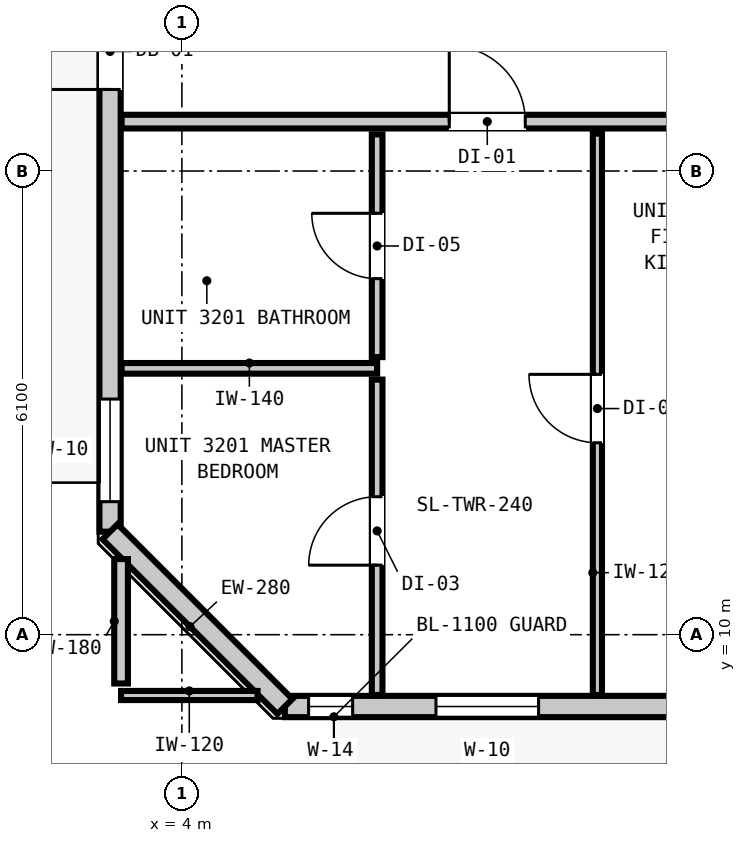
"""IFC4 building model, lengths in metres.
Left out: names, types, materials, properties, quantities, classifications, styles, units other than length and angle.
Written with IfcOpenShell. Run it as: python <this file> out.ifc"""

import sys

from ifc_helpers import new_model, si_unit, direction, frame, frame_2d, origin, place, context, subcontext, project, spatial, rectangle, extrude, element, fill, save


model = new_model("IFC4")
c1 = context("Model", 3, precision=1e-05, world=origin(), true_north=direction((0.0, 1.0)))
c2 = subcontext(c1, "Body", "Model", "MODEL_VIEW")
j1 = project(units=[si_unit("LENGTHUNIT", "METRE"), si_unit("PLANEANGLEUNIT", "RADIAN")], contexts=[c1])
p1 = place(None, origin())
s1 = spatial("IfcSite", under=j1, at=p1, CompositionType="ELEMENT")
p2 = place(p1, origin())
s2 = spatial("IfcBuilding", under=s1, at=p2, CompositionType="ELEMENT")
p3 = place(p2, frame((0.0, 0.0, 112.72)))
s3 = spatial("IfcBuildingStorey", under=s2, at=p3, CompositionType="ELEMENT", Elevation=112.72)
p4 = place(p3, frame((3.055, 11.355, 0.0), z_axis=(0.0, 0.0, 1.0), x_axis=(0.0, 1.0, 0.0)))
e1 = element("IfcWall", 1, at=p4, inside=s3, PredefinedType="STANDARD", context=c2, shape_type="SweptSolid", body=[
    extrude(rectangle(XDim=32.29, YDim=0.28, at=frame_2d((16.145, 0.0))), origin(), (0.0, 0.0, 1.0), 3.08),
])
p5 = place(p4, frame((5.818, 0.0, 0.0)))
e2 = element("IfcOpeningElement", 2, at=p5, cuts=e1, PredefinedType="OPENING", context=c2, shape_type="SweptSolid", body=[
    extrude(rectangle(XDim=1.0, YDim=2.15, at=frame_2d((0.5, 1.075))), frame((0.0, 0.15, 0.0), z_axis=(0.0, -1.0, 0.0), x_axis=(1.0, 0.0, 0.0)), (0.0, 0.0, 1.0), 0.3),
])
p6 = place(p4, frame((0.395, 0.0, 0.85)))
e3 = element("IfcOpeningElement", 3, at=p6, cuts=e1, PredefinedType="OPENING", context=c2, shape_type="SweptSolid", body=[
    extrude(rectangle(XDim=1.35, YDim=1.85, at=frame_2d((0.675, 0.925))), frame((0.0, 0.15, 0.0), z_axis=(0.0, -1.0, 0.0), x_axis=(1.0, 0.0, 0.0)), (0.0, 0.0, 1.0), 0.3),
])
p7 = place(p4, frame((20.78, 0.0, 0.85)))
e4 = element("IfcOpeningElement", 4, at=p7, cuts=e1, PredefinedType="OPENING", context=c2, shape_type="SweptSolid", body=[
    extrude(rectangle(XDim=1.35, YDim=1.85, at=frame_2d((0.675, 0.925))), frame((0.0, 0.15, 0.0), z_axis=(0.0, -1.0, 0.0), x_axis=(1.0, 0.0, 0.0)), (0.0, 0.0, 1.0), 0.3),
])
p8 = place(p4, frame((12.61, 0.0, 0.85)))
e5 = element("IfcOpeningElement", 5, at=p8, cuts=e1, PredefinedType="OPENING", context=c2, shape_type="SweptSolid", body=[
    extrude(rectangle(XDim=1.35, YDim=1.85, at=frame_2d((0.675, 0.925))), frame((0.0, 0.15, 0.0), z_axis=(0.0, -1.0, 0.0), x_axis=(1.0, 0.0, 0.0)), (0.0, 0.0, 1.0), 0.3),
])
p9 = place(p4, frame((24.73, 0.0, 0.85)))
e6 = element("IfcOpeningElement", 6, at=p9, cuts=e1, PredefinedType="OPENING", context=c2, shape_type="SweptSolid", body=[
    extrude(rectangle(XDim=1.35, YDim=1.85, at=frame_2d((0.675, 0.925))), frame((0.0, 0.15, 0.0), z_axis=(0.0, -1.0, 0.0), x_axis=(1.0, 0.0, 0.0)), (0.0, 0.0, 1.0), 0.3),
])
p10 = place(p3, frame((40.445, 9.055, 0.0), z_axis=(0.0, 0.0, 1.0), x_axis=(-1.0, 0.0, 0.0)))
e7 = element("IfcWall", 7, at=p10, inside=s3, PredefinedType="STANDARD", context=c2, shape_type="SweptSolid", body=[
    extrude(rectangle(XDim=35.09, YDim=0.28, at=frame_2d((17.545, 0.0))), origin(), (0.0, 0.0, 1.0), 3.08),
])
p11 = place(p10, frame((5.114, 0.0, 0.0)))
e8 = element("IfcOpeningElement", 8, at=p11, cuts=e7, PredefinedType="OPENING", context=c2, shape_type="SweptSolid", body=[
    extrude(rectangle(XDim=1.0, YDim=2.15, at=frame_2d((0.5, 1.075))), frame((0.0, 0.15, 0.0), z_axis=(0.0, -1.0, 0.0), x_axis=(1.0, 0.0, 0.0)), (0.0, 0.0, 1.0), 0.3),
])
p12 = place(p10, frame((31.752, 0.0, 0.85)))
e9 = element("IfcOpeningElement", 9, at=p12, cuts=e7, PredefinedType="OPENING", context=c2, shape_type="SweptSolid", body=[
    extrude(rectangle(XDim=1.35, YDim=1.85, at=frame_2d((0.675, 0.925))), frame((0.0, 0.15, 0.0), z_axis=(0.0, -1.0, 0.0), x_axis=(1.0, 0.0, 0.0)), (0.0, 0.0, 1.0), 0.3),
])
p13 = place(p10, frame((34.198, 0.0, 0.85)))
e10 = element("IfcOpeningElement", 10, at=p13, cuts=e7, PredefinedType="OPENING", context=c2, shape_type="SweptSolid", body=[
    extrude(rectangle(XDim=0.58, YDim=1.5, at=frame_2d((0.29, 0.75))), frame((0.0, 0.15, 0.0), z_axis=(0.0, -1.0, 0.0), x_axis=(1.0, 0.0, 0.0)), (0.0, 0.0, 1.0), 0.3),
])
p14 = place(p10, frame((21.39, 0.0, 0.85)))
e11 = element("IfcOpeningElement", 11, at=p14, cuts=e7, PredefinedType="OPENING", context=c2, shape_type="SweptSolid", body=[
    extrude(rectangle(XDim=1.35, YDim=1.85, at=frame_2d((0.675, 0.925))), frame((0.0, 0.15, 0.0), z_axis=(0.0, -1.0, 0.0), x_axis=(1.0, 0.0, 0.0)), (0.0, 0.0, 1.0), 0.3),
])
p15 = place(p10, frame((24.59, 0.0, 0.85)))
e12 = element("IfcOpeningElement", 12, at=p15, cuts=e7, PredefinedType="OPENING", context=c2, shape_type="SweptSolid", body=[
    extrude(rectangle(XDim=1.35, YDim=1.85, at=frame_2d((0.675, 0.925))), frame((0.0, 0.15, 0.0), z_axis=(0.0, -1.0, 0.0), x_axis=(1.0, 0.0, 0.0)), (0.0, 0.0, 1.0), 0.3),
])
p16 = place(p10, frame((14.699, 0.0, 0.85)))
e13 = element("IfcOpeningElement", 13, at=p16, cuts=e7, PredefinedType="OPENING", context=c2, shape_type="SweptSolid", body=[
    extrude(rectangle(XDim=1.35, YDim=1.85, at=frame_2d((0.675, 0.925))), frame((0.0, 0.15, 0.0), z_axis=(0.0, -1.0, 0.0), x_axis=(1.0, 0.0, 0.0)), (0.0, 0.0, 1.0), 0.3),
])
p17 = place(p10, frame((6.557, 0.0, 0.85)))
e14 = element("IfcOpeningElement", 14, at=p17, cuts=e7, PredefinedType="OPENING", context=c2, shape_type="SweptSolid", body=[
    extrude(rectangle(XDim=1.35, YDim=1.85, at=frame_2d((0.675, 0.925))), frame((0.0, 0.15, 0.0), z_axis=(0.0, -1.0, 0.0), x_axis=(1.0, 0.0, 0.0)), (0.0, 0.0, 1.0), 0.3),
])
p18 = place(p10, frame((8.823, 0.0, 0.85)))
e15 = element("IfcOpeningElement", 15, at=p18, cuts=e7, PredefinedType="OPENING", context=c2, shape_type="SweptSolid", body=[
    extrude(rectangle(XDim=1.35, YDim=1.85, at=frame_2d((0.675, 0.925))), frame((0.0, 0.15, 0.0), z_axis=(0.0, -1.0, 0.0), x_axis=(1.0, 0.0, 0.0)), (0.0, 0.0, 1.0), 0.3),
])
p19 = place(p3, frame((5.355, 9.055, 0.0), z_axis=(0.0, 0.0, 1.0), x_axis=(-0.707106781187, 0.707106781187, 0.0)))
e16 = element("IfcWall", 16, at=p19, inside=s3, PredefinedType="STANDARD", context=c2, shape_type="SweptSolid", body=[
    extrude(rectangle(XDim=3.253, YDim=0.28, at=frame_2d((1.626, 0.0))), origin(), (0.0, 0.0, 1.0), 3.08),
])
p20 = place(p3, frame((3.207, 16.75, 0.0), z_axis=(0.0, 0.0, 1.0), x_axis=(1.0, 0.0, 0.0)))
e17 = element("IfcWall", 17, at=p20, inside=s3, PredefinedType="PARTITIONING", context=c2, shape_type="SweptSolid", body=[
    extrude(rectangle(XDim=39.386, YDim=0.18, at=frame_2d((19.693, 0.0))), origin(), (0.0, 0.0, 1.0), 3.08),
])
p21 = place(p20, frame((4.311, 0.0, 0.0)))
e18 = element("IfcOpeningElement", 18, at=p21, cuts=e17, PredefinedType="OPENING", context=c2, shape_type="SweptSolid", body=[
    extrude(rectangle(XDim=1.0, YDim=2.15, at=frame_2d((0.5, 1.075))), frame((0.0, 0.1, 0.0), z_axis=(0.0, -1.0, 0.0), x_axis=(1.0, 0.0, 0.0)), (0.0, 0.0, 1.0), 0.2),
])
p22 = place(p20, frame((15.834, 0.0, 0.0)))
e19 = element("IfcOpeningElement", 19, at=p22, cuts=e17, PredefinedType="OPENING", context=c2, shape_type="SweptSolid", body=[
    extrude(rectangle(XDim=1.0, YDim=2.15, at=frame_2d((0.5, 1.075))), frame((0.0, 0.1, 0.0), z_axis=(0.0, -1.0, 0.0), x_axis=(1.0, 0.0, 0.0)), (0.0, 0.0, 1.0), 0.2),
])
p23 = place(p20, frame((31.654, 0.0, 0.0)))
e20 = element("IfcOpeningElement", 20, at=p23, cuts=e17, PredefinedType="OPENING", context=c2, shape_type="SweptSolid", body=[
    extrude(rectangle(XDim=1.0, YDim=2.15, at=frame_2d((0.5, 1.075))), frame((0.0, 0.1, 0.0), z_axis=(0.0, -1.0, 0.0), x_axis=(1.0, 0.0, 0.0)), (0.0, 0.0, 1.0), 0.2),
])
p24 = place(p3, frame((3.207, 13.504, 0.0), z_axis=(0.0, 0.0, 1.0), x_axis=(1.0, 0.0, 0.0)))
e21 = element("IfcWall", 21, at=p24, inside=s3, PredefinedType="PARTITIONING", context=c2, shape_type="SweptSolid", body=[
    extrude(rectangle(XDim=3.362, YDim=0.14, at=frame_2d((1.681, 0.0))), origin(), (0.0, 0.0, 1.0), 3.08),
])
p25 = place(p3, frame((3.2, 9.2, 0.0), z_axis=(0.0, 0.0, 1.0), x_axis=(1.0, 0.0, 0.0)))
e22 = element("IfcWall", 22, at=p25, inside=s3, PredefinedType="PARTITIONING", context=c2, shape_type="SweptSolid", body=[
    extrude(rectangle(XDim=1.795, YDim=0.12, at=frame_2d((0.897, 0.0))), origin(), (0.0, 0.0, 1.0), 3.08),
])
p26 = place(p3, frame((3.2, 9.358, 0.0), z_axis=(0.0, 0.0, 1.0), x_axis=(0.0, 1.0, 0.0)))
e23 = element("IfcWall", 23, at=p26, inside=s3, PredefinedType="PARTITIONING", context=c2, shape_type="SweptSolid", body=[
    extrude(rectangle(XDim=1.637, YDim=0.18, at=frame_2d((0.819, 0.0))), origin(), (0.0, 0.0, 1.0), 3.08),
])
p27 = place(p3, frame((6.569, 9.207, 0.0), z_axis=(0.0, 0.0, 1.0), x_axis=(0.0, 1.0, 0.0)))
e24 = element("IfcWall", 24, at=p27, inside=s3, PredefinedType="PARTITIONING", context=c2, shape_type="SweptSolid", body=[
    extrude(rectangle(XDim=4.149, YDim=0.14, at=frame_2d((2.074, 0.0))), origin(), (0.0, 0.0, 1.0), 3.08),
])
p28 = place(p27, frame((1.708, 0.0, 0.0)))
e25 = element("IfcOpeningElement", 25, at=p28, cuts=e24, PredefinedType="OPENING", context=c2, shape_type="SweptSolid", body=[
    extrude(rectangle(XDim=0.9, YDim=2.1, at=frame_2d((0.45, 1.05))), frame((0.0, 0.08, 0.0), z_axis=(0.0, -1.0, 0.0), x_axis=(1.0, 0.0, 0.0)), (0.0, 0.0, 1.0), 0.16),
])
p29 = place(p3, frame((6.569, 13.652, 0.0), z_axis=(0.0, 0.0, 1.0), x_axis=(0.0, 1.0, 0.0)))
e26 = element("IfcWall", 26, at=p29, inside=s3, PredefinedType="PARTITIONING", context=c2, shape_type="SweptSolid", body=[
    extrude(rectangle(XDim=2.93, YDim=0.14, at=frame_2d((1.465, 0.0))), origin(), (0.0, 0.0, 1.0), 3.08),
])
p30 = place(p29, frame((1.032, 0.0, 0.0)))
e27 = element("IfcOpeningElement", 27, at=p30, cuts=e26, PredefinedType="OPENING", context=c2, shape_type="SweptSolid", body=[
    extrude(rectangle(XDim=0.86, YDim=2.02, at=frame_2d((0.43, 1.01))), frame((0.0, 0.08, 0.0), z_axis=(0.0, -1.0, 0.0), x_axis=(1.0, 0.0, 0.0)), (0.0, 0.0, 1.0), 0.16),
])
p31 = place(p3, frame((9.467, 9.207, 0.0), z_axis=(0.0, 0.0, 1.0), x_axis=(0.0, 1.0, 0.0)))
e28 = element("IfcWall", 28, at=p31, inside=s3, PredefinedType="PARTITIONING", context=c2, shape_type="SweptSolid", body=[
    extrude(rectangle(XDim=7.385, YDim=0.12, at=frame_2d((3.692, 0.0))), origin(), (0.0, 0.0, 1.0), 3.08),
])
p32 = place(p31, frame((3.318, 0.0, 0.0)))
e29 = element("IfcOpeningElement", 29, at=p32, cuts=e28, PredefinedType="OPENING", context=c2, shape_type="SweptSolid", body=[
    extrude(rectangle(XDim=0.9, YDim=2.1, at=frame_2d((0.45, 1.05))), frame((0.0, 0.07, 0.0), z_axis=(0.0, -1.0, 0.0), x_axis=(1.0, 0.0, 0.0)), (0.0, 0.0, 1.0), 0.14),
])
p33 = place(p5, origin())
e30 = element("IfcDoor", 30, at=p33, inside=s3, OperationType="SINGLE_SWING_LEFT", PredefinedType="DOOR", context=c2, shape_type="SweptSolid", body=[
    extrude(rectangle(XDim=1.0, YDim=2.15, at=frame_2d((0.5, 1.075))), frame((0.0, 0.025, 0.0), z_axis=(0.0, -1.0, 0.0), x_axis=(1.0, 0.0, 0.0)), (0.0, 0.0, 1.0), 0.05),
])
fill(e2, e30)
p34 = place(p6, origin())
e31 = element("IfcWindow", 31, at=p34, inside=s3, PartitioningType="SINGLE_PANEL", PredefinedType="WINDOW", context=c2, shape_type="SweptSolid", body=[
    extrude(rectangle(XDim=1.35, YDim=1.85, at=frame_2d((0.675, 0.925))), frame((0.0, 0.03, 0.0), z_axis=(0.0, -1.0, 0.0), x_axis=(1.0, 0.0, 0.0)), (0.0, 0.0, 1.0), 0.06),
])
fill(e3, e31)
p35 = place(p12, origin())
e32 = element("IfcWindow", 32, at=p35, inside=s3, PartitioningType="SINGLE_PANEL", PredefinedType="WINDOW", context=c2, shape_type="SweptSolid", body=[
    extrude(rectangle(XDim=1.35, YDim=1.85, at=frame_2d((0.675, 0.925))), frame((0.0, 0.03, 0.0), z_axis=(0.0, -1.0, 0.0), x_axis=(1.0, 0.0, 0.0)), (0.0, 0.0, 1.0), 0.06),
])
fill(e9, e32)
p36 = place(p13, origin())
e33 = element("IfcWindow", 33, at=p36, inside=s3, PartitioningType="SINGLE_PANEL", PredefinedType="WINDOW", context=c2, shape_type="SweptSolid", body=[
    extrude(rectangle(XDim=0.58, YDim=1.5, at=frame_2d((0.29, 0.75))), frame((0.0, 0.03, 0.0), z_axis=(0.0, -1.0, 0.0), x_axis=(1.0, 0.0, 0.0)), (0.0, 0.0, 1.0), 0.06),
])
fill(e10, e33)
p37 = place(p21, origin())
e34 = element("IfcDoor", 34, at=p37, inside=s3, OperationType="SINGLE_SWING_LEFT", PredefinedType="DOOR", context=c2, shape_type="SweptSolid", body=[
    extrude(rectangle(XDim=1.0, YDim=2.15, at=frame_2d((0.5, 1.075))), frame((0.0, 0.025, 0.0), z_axis=(0.0, -1.0, 0.0), x_axis=(1.0, 0.0, 0.0)), (0.0, 0.0, 1.0), 0.05),
])
fill(e18, e34)
p38 = place(p30, origin())
e35 = element("IfcDoor", 35, at=p38, inside=s3, OperationType="SINGLE_SWING_RIGHT", PredefinedType="DOOR", context=c2, shape_type="SweptSolid", body=[
    extrude(rectangle(XDim=0.86, YDim=2.02, at=frame_2d((0.43, 1.01))), frame((0.0, 0.025, 0.0), z_axis=(0.0, -1.0, 0.0), x_axis=(1.0, 0.0, 0.0)), (0.0, 0.0, 1.0), 0.05),
])
fill(e27, e35)
p39 = place(p28, origin())
e36 = element("IfcDoor", 36, at=p39, inside=s3, OperationType="SINGLE_SWING_LEFT", PredefinedType="DOOR", context=c2, shape_type="SweptSolid", body=[
    extrude(rectangle(XDim=0.9, YDim=2.1, at=frame_2d((0.45, 1.05))), frame((0.0, 0.025, 0.0), z_axis=(0.0, -1.0, 0.0), x_axis=(1.0, 0.0, 0.0)), (0.0, 0.0, 1.0), 0.05),
])
fill(e25, e36)
p40 = place(p32, origin())
e37 = element("IfcDoor", 37, at=p40, inside=s3, OperationType="SINGLE_SWING_RIGHT", PredefinedType="DOOR", context=c2, shape_type="SweptSolid", body=[
    extrude(rectangle(XDim=0.9, YDim=2.1, at=frame_2d((0.45, 1.05))), frame((0.0, 0.025, 0.0), z_axis=(0.0, -1.0, 0.0), x_axis=(1.0, 0.0, 0.0)), (0.0, 0.0, 1.0), 0.05),
])
fill(e29, e37)
save(model, sys.argv[1])
